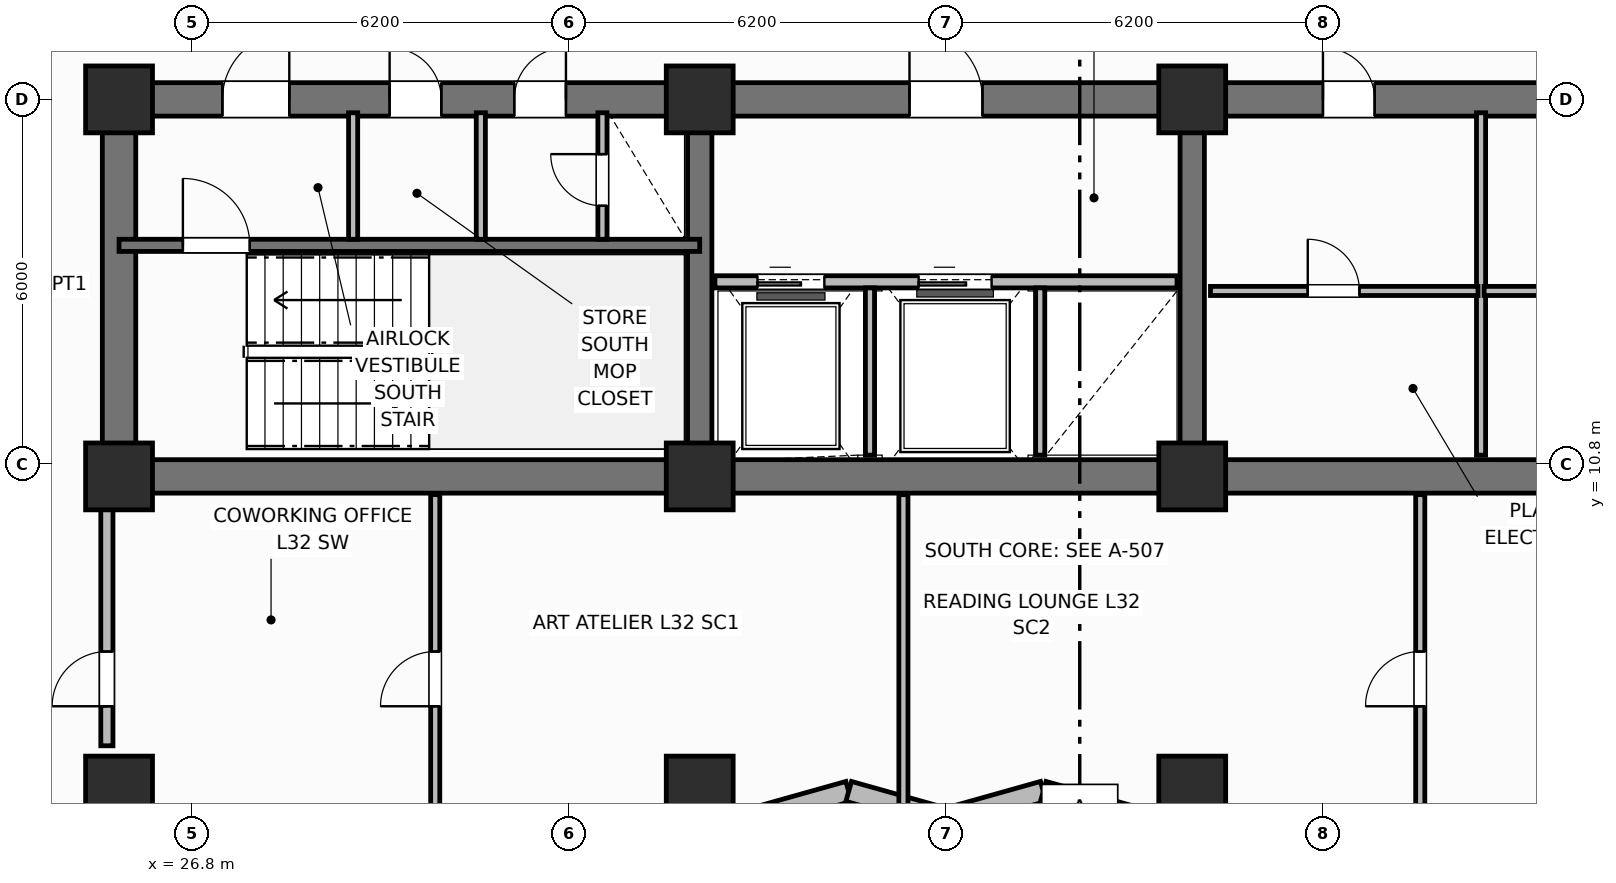
"""IFC4 building model, lengths in metres.
Left out: names, types, materials, properties, quantities, classifications, styles, units other than length and angle.
Written with IfcOpenShell. Run it as: python <this file> out.ifc"""

import sys

from ifc_helpers import new_model, si_unit, direction, frame, frame_2d, origin, origin_2d, place, context, subcontext, project, spatial, rectangle, extrude, element, fill, save


model = new_model("IFC4")
c1 = context("Model", 3, precision=1e-05, world=origin(), true_north=direction((0.0, 1.0)))
c2 = subcontext(c1, "Body", "Model", "MODEL_VIEW")
j1 = project(units=[si_unit("LENGTHUNIT", "METRE"), si_unit("PLANEANGLEUNIT", "RADIAN")], contexts=[c1])
p1 = place(None, origin())
s1 = spatial("IfcSite", under=j1, at=p1, CompositionType="ELEMENT")
p2 = place(p1, origin())
s2 = spatial("IfcBuilding", under=s1, at=p2, CompositionType="ELEMENT")
p3 = place(p2, frame((0.0, 0.0, 129.0)))
s3 = spatial("IfcBuildingStorey", under=s2, at=p3, CompositionType="ELEMENT", Elevation=129.0)
p4 = place(p3, frame((52.8, 10.6, 0.0), z_axis=(0.0, 0.0, 1.0), x_axis=(-1.0, 0.0, 0.0)))
e1 = element("IfcWall", 1, at=p4, inside=s3, PredefinedType="SHEAR", context=c2, shape_type="SweptSolid", body=[
    extrude(rectangle(XDim=27.2, YDim=0.55, at=frame_2d((13.6, 0.0))), origin(), (0.0, 0.0, 1.0), 3.7),
])
p5 = place(p3, frame((25.6, 10.875, 0.0), z_axis=(0.0, 0.0, 1.0), x_axis=(0.0, 1.0, 0.0)))
e2 = element("IfcWall", 2, at=p5, inside=s3, PredefinedType="SHEAR", context=c2, shape_type="SweptSolid", body=[
    extrude(rectangle(XDim=5.65, YDim=0.55, at=frame_2d((2.825, 0.0))), origin(), (0.0, 0.0, 1.0), 3.7),
])
p6 = place(p3, frame((25.6, 16.8, 0.0), z_axis=(0.0, 0.0, 1.0), x_axis=(1.0, 0.0, 0.0)))
e3 = element("IfcWall", 3, at=p6, inside=s3, PredefinedType="SHEAR", context=c2, shape_type="SweptSolid", body=[
    extrude(rectangle(XDim=27.2, YDim=0.55, at=frame_2d((13.6, 0.0))), origin(), (0.0, 0.0, 1.0), 3.7),
])
p7 = place(p6, frame((1.7, 0.0, 0.0)))
e4 = element("IfcOpeningElement", 4, at=p7, cuts=e3, PredefinedType="OPENING", context=c2, shape_type="SweptSolid", body=[
    extrude(rectangle(XDim=1.1, YDim=2.15, at=frame_2d((0.55, 1.075))), frame((0.0, 0.285, 0.0), z_axis=(0.0, -1.0, 0.0), x_axis=(1.0, 0.0, 0.0)), (0.0, 0.0, 1.0), 0.57),
])
p8 = place(p6, frame((4.45, 0.0, 0.0)))
e5 = element("IfcOpeningElement", 5, at=p8, cuts=e3, PredefinedType="OPENING", context=c2, shape_type="SweptSolid", body=[
    extrude(rectangle(XDim=0.85, YDim=2.1, at=frame_2d((0.425, 1.05))), frame((0.0, 0.285, 0.0), z_axis=(0.0, -1.0, 0.0), x_axis=(1.0, 0.0, 0.0)), (0.0, 0.0, 1.0), 0.57),
])
p9 = place(p6, frame((6.5, 0.0, 0.0)))
e6 = element("IfcOpeningElement", 6, at=p9, cuts=e3, PredefinedType="OPENING", context=c2, shape_type="SweptSolid", body=[
    extrude(rectangle(XDim=0.85, YDim=2.1, at=frame_2d((0.425, 1.05))), frame((0.0, 0.285, 0.0), z_axis=(0.0, -1.0, 0.0), x_axis=(1.0, 0.0, 0.0)), (0.0, 0.0, 1.0), 0.57),
])
p10 = place(p6, frame((13.0, 0.0, 0.0)))
e7 = element("IfcOpeningElement", 7, at=p10, cuts=e3, PredefinedType="OPENING", context=c2, shape_type="SweptSolid", body=[
    extrude(rectangle(XDim=1.2, YDim=2.15, at=frame_2d((0.6, 1.075))), frame((0.0, 0.285, 0.0), z_axis=(0.0, -1.0, 0.0), x_axis=(1.0, 0.0, 0.0)), (0.0, 0.0, 1.0), 0.57),
])
p11 = place(p6, frame((19.8, 0.0, 0.0)))
e8 = element("IfcOpeningElement", 8, at=p11, cuts=e3, PredefinedType="OPENING", context=c2, shape_type="SweptSolid", body=[
    extrude(rectangle(XDim=0.85, YDim=2.1, at=frame_2d((0.425, 1.05))), frame((0.0, 0.285, 0.0), z_axis=(0.0, -1.0, 0.0), x_axis=(1.0, 0.0, 0.0)), (0.0, 0.0, 1.0), 0.57),
])
p12 = place(p6, frame((24.2, 0.0, 0.0)))
e9 = element("IfcOpeningElement", 9, at=p12, cuts=e3, PredefinedType="OPENING", context=c2, shape_type="SweptSolid", body=[
    extrude(rectangle(XDim=0.85, YDim=2.1, at=frame_2d((0.425, 1.05))), frame((0.0, 0.285, 0.0), z_axis=(0.0, -1.0, 0.0), x_axis=(1.0, 0.0, 0.0)), (0.0, 0.0, 1.0), 0.57),
])
for number, where, z_axis, x_axis in (
    (10, (35.15, 10.875, 0.0), (0.0, 0.0, 1.0), (0.0, 1.0, 0.0)),
    (11, (43.25, 10.875, 0.0), (0.0, 0.0, 1.0), (0.0, 1.0, 0.0)),
):
    element("IfcWall", number, at=place(p3, frame(where, z_axis=z_axis, x_axis=x_axis)), inside=s3, PredefinedType="SHEAR", context=c2, shape_type="SweptSolid", body=[
        extrude(rectangle(XDim=5.65, YDim=0.4, at=frame_2d((2.825, 0.0))), origin(), (0.0, 0.0, 1.0), 3.7),
    ])
for number, where, z_axis, x_axis in (
    (12, (25.6, 10.6, 0.0), (0.0, 0.0, 1.0), (1.0, 0.0, 0.0)),
    (13, (25.6, 16.8, 0.0), (0.0, 0.0, 1.0), (1.0, 0.0, 0.0)),
    (14, (35.15, 10.6, 0.0), (0.0, 0.0, 1.0), (1.0, 0.0, 0.0)),
    (15, (35.15, 16.8, 0.0), (0.0, 0.0, 1.0), (1.0, 0.0, 0.0)),
    (16, (43.25, 10.6, 0.0), (0.0, 0.0, 1.0), (1.0, 0.0, 0.0)),
    (17, (43.25, 16.8, 0.0), (0.0, 0.0, 1.0), (1.0, 0.0, 0.0)),
    (18, (25.6, 5.45, 0.0), (0.0, 0.0, 1.0), (1.0, 0.0, 0.0)),
    (19, (35.15, 5.45, 0.0), (0.0, 0.0, 1.0), (1.0, 0.0, 0.0)),
    (20, (43.25, 5.45, 0.0), (0.0, 0.0, 1.0), (1.0, 0.0, 0.0)),
):
    element("IfcColumn", number, at=place(p3, frame(where, z_axis=z_axis, x_axis=x_axis)), inside=s3, PredefinedType="COLUMN", context=c2, shape_type="SweptSolid", body=[
        extrude(rectangle(XDim=1.1, YDim=1.1, at=origin_2d()), origin(), (0.0, 0.0, 1.0), 3.7),
    ])
p13 = place(p3, frame((36.0, 4.97, 0.0), z_axis=(0.0, 0.0, 1.0), x_axis=(0.962662902433, 0.270703040766, 0.0)))
e21 = element("IfcWall", 21, at=p13, inside=s3, PredefinedType="SOLIDWALL", context=c2, shape_type="SweptSolid", body=[
    extrude(rectangle(XDim=1.662, YDim=0.34, at=frame_2d((0.831, 0.0))), origin(), (0.0, 0.0, 1.0), 2.7),
])
p14 = place(p3, frame((37.6, 5.42, 0.0), z_axis=(0.0, 0.0, 1.0), x_axis=(0.962652136636, -0.270741322725, 0.0)))
e22 = element("IfcWall", 22, at=p14, inside=s3, PredefinedType="SOLIDWALL", context=c2, shape_type="SweptSolid", body=[
    extrude(rectangle(XDim=1.662, YDim=0.34, at=frame_2d((0.831, 0.0))), origin(), (0.0, 0.0, 1.0), 2.7),
])
p15 = place(p3, frame((39.2, 4.97, 0.0), z_axis=(0.0, 0.0, 1.0), x_axis=(0.962662902433, 0.270703040766, 0.0)))
e23 = element("IfcWall", 23, at=p15, inside=s3, PredefinedType="SOLIDWALL", context=c2, shape_type="SweptSolid", body=[
    extrude(rectangle(XDim=1.662, YDim=0.34, at=frame_2d((0.831, 0.0))), origin(), (0.0, 0.0, 1.0), 2.7),
])
p16 = place(p3, frame((40.8, 5.42, 0.0), z_axis=(0.0, 0.0, 1.0), x_axis=(0.962652136636, -0.270741322725, 0.0)))
e24 = element("IfcWall", 24, at=p16, inside=s3, PredefinedType="SOLIDWALL", context=c2, shape_type="SweptSolid", body=[
    extrude(rectangle(XDim=1.662, YDim=0.34, at=frame_2d((0.831, 0.0))), origin(), (0.0, 0.0, 1.0), 2.7),
])
p17 = place(p3, frame((25.6, 14.4, 0.0), z_axis=(0.0, 0.0, 1.0), x_axis=(1.0, 0.0, 0.0)))
e25 = element("IfcWall", 25, at=p17, inside=s3, PredefinedType="SHEAR", context=c2, shape_type="SweptSolid", body=[
    extrude(rectangle(XDim=9.55, YDim=0.2, at=frame_2d((4.775, 0.0))), origin(), (0.0, 0.0, 1.0), 3.7),
])
p18 = place(p17, frame((1.05, 0.0, 0.0)))
e26 = element("IfcOpeningElement", 26, at=p18, cuts=e25, PredefinedType="OPENING", context=c2, shape_type="SweptSolid", body=[
    extrude(rectangle(XDim=1.1, YDim=2.15, at=frame_2d((0.55, 1.075))), frame((0.0, 0.11, 0.0), z_axis=(0.0, -1.0, 0.0), x_axis=(1.0, 0.0, 0.0)), (0.0, 0.0, 1.0), 0.22),
])
for number, where, z_axis, x_axis in (
    (27, (29.45, 14.5, 0.0), (0.0, 0.0, 1.0), (0.0, 1.0, 0.0)),
    (28, (31.55, 14.5, 0.0), (0.0, 0.0, 1.0), (0.0, 1.0, 0.0)),
):
    element("IfcWall", number, at=place(p3, frame(where, z_axis=z_axis, x_axis=x_axis)), inside=s3, PredefinedType="PARTITIONING", context=c2, shape_type="SweptSolid", body=[
        extrude(rectangle(XDim=2.08, YDim=0.15, at=frame_2d((1.04, 0.0))), origin(), (0.0, 0.0, 1.0), 2.53),
    ])
p19 = place(p3, frame((33.55, 14.5, 0.0), z_axis=(0.0, 0.0, 1.0), x_axis=(0.0, 1.0, 0.0)))
e29 = element("IfcWall", 29, at=p19, inside=s3, PredefinedType="PARTITIONING", context=c2, shape_type="SweptSolid", body=[
    extrude(rectangle(XDim=2.08, YDim=0.15, at=frame_2d((1.04, 0.0))), origin(), (0.0, 0.0, 1.0), 2.53),
])
p20 = place(p19, frame((0.55, 0.0, 0.0)))
e30 = element("IfcOpeningElement", 30, at=p20, cuts=e29, PredefinedType="OPENING", context=c2, shape_type="SweptSolid", body=[
    extrude(rectangle(XDim=0.85, YDim=2.05, at=frame_2d((0.425, 1.025))), frame((0.0, 0.085, 0.0), z_axis=(0.0, -1.0, 0.0), x_axis=(1.0, 0.0, 0.0)), (0.0, 0.0, 1.0), 0.17),
])
p21 = place(p3, frame((35.4, 13.8, 0.0), z_axis=(0.0, 0.0, 1.0), x_axis=(1.0, 0.0, 0.0)))
e31 = element("IfcWall", 31, at=p21, inside=s3, PredefinedType="PARTITIONING", context=c2, shape_type="SweptSolid", body=[
    extrude(rectangle(XDim=7.6, YDim=0.2, at=frame_2d((3.8, 0.0))), origin(), (0.0, 0.0, 1.0), 2.3),
])
p22 = place(p21, frame((0.7, 0.0, 0.0)))
e32 = element("IfcOpeningElement", 32, at=p22, cuts=e31, PredefinedType="OPENING", context=c2, shape_type="SweptSolid", body=[
    extrude(rectangle(XDim=1.1, YDim=2.15, at=frame_2d((0.55, 1.075))), frame((0.0, 0.11, 0.0), z_axis=(0.0, -1.0, 0.0), x_axis=(1.0, 0.0, 0.0)), (0.0, 0.0, 1.0), 0.22),
])
p23 = place(p21, frame((3.35, 0.0, 0.0)))
e33 = element("IfcOpeningElement", 33, at=p23, cuts=e31, PredefinedType="OPENING", context=c2, shape_type="SweptSolid", body=[
    extrude(rectangle(XDim=1.2, YDim=2.15, at=frame_2d((0.6, 1.075))), frame((0.0, 0.11, 0.0), z_axis=(0.0, -1.0, 0.0), x_axis=(1.0, 0.0, 0.0)), (0.0, 0.0, 1.0), 0.22),
])
for number, where, z_axis, x_axis in (
    (34, (37.95, 10.95, 0.0), (0.0, 0.0, 1.0), (0.0, 1.0, 0.0)),
    (35, (40.75, 10.95, 0.0), (0.0, 0.0, 1.0), (0.0, 1.0, 0.0)),
):
    element("IfcWall", number, at=place(p3, frame(where, z_axis=z_axis, x_axis=x_axis)), inside=s3, PredefinedType="PARTITIONING", context=c2, shape_type="SweptSolid", body=[
        extrude(rectangle(XDim=2.75, YDim=0.15, at=frame_2d((1.375, 0.0))), origin(), (0.0, 0.0, 1.0), 2.53),
    ])
p24 = place(p3, frame((48.0, 10.95, 0.0), z_axis=(0.0, 0.0, 1.0), x_axis=(0.0, 1.0, 0.0)))
e36 = element("IfcWall", 36, at=p24, inside=s3, PredefinedType="PARTITIONING", context=c2, shape_type="SweptSolid", body=[
    extrude(rectangle(XDim=5.63, YDim=0.15, at=frame_2d((2.815, 0.0))), origin(), (0.0, 0.0, 1.0), 2.53),
])
p25 = place(p3, frame((43.55, 13.65, 0.0), z_axis=(0.0, 0.0, 1.0), x_axis=(1.0, 0.0, 0.0)))
e37 = element("IfcWall", 37, at=p25, inside=s3, PredefinedType="PARTITIONING", context=c2, shape_type="SweptSolid", body=[
    extrude(rectangle(XDim=4.4, YDim=0.15, at=frame_2d((2.2, 0.0))), origin(), (0.0, 0.0, 1.0), 2.53),
])
p26 = place(p25, frame((1.6, 0.0, 0.0)))
e38 = element("IfcOpeningElement", 38, at=p26, cuts=e37, PredefinedType="OPENING", context=c2, shape_type="SweptSolid", body=[
    extrude(rectangle(XDim=0.85, YDim=2.1, at=frame_2d((0.425, 1.05))), frame((0.0, 0.085, 0.0), z_axis=(0.0, -1.0, 0.0), x_axis=(1.0, 0.0, 0.0)), (0.0, 0.0, 1.0), 0.17),
])
p27 = place(p3, frame((48.05, 13.65, 0.0), z_axis=(0.0, 0.0, 1.0), x_axis=(1.0, 0.0, 0.0)))
e39 = element("IfcWall", 39, at=p27, inside=s3, PredefinedType="PARTITIONING", context=c2, shape_type="SweptSolid", body=[
    extrude(rectangle(XDim=4.4, YDim=0.15, at=frame_2d((2.2, 0.0))), origin(), (0.0, 0.0, 1.0), 2.53),
])
p28 = place(p27, frame((1.6, 0.0, 0.0)))
e40 = element("IfcOpeningElement", 40, at=p28, cuts=e39, PredefinedType="OPENING", context=c2, shape_type="SweptSolid", body=[
    extrude(rectangle(XDim=0.85, YDim=2.1, at=frame_2d((0.425, 1.05))), frame((0.0, 0.085, 0.0), z_axis=(0.0, -1.0, 0.0), x_axis=(1.0, 0.0, 0.0)), (0.0, 0.0, 1.0), 0.17),
])
p29 = place(p3, frame((30.8, 4.97, 0.0), z_axis=(0.0, 0.0, 1.0), x_axis=(0.0, 1.0, 0.0)))
e41 = element("IfcWall", 41, at=p29, inside=s3, PredefinedType="PARTITIONING", context=c2, shape_type="SweptSolid", body=[
    extrude(rectangle(XDim=5.33, YDim=0.15, at=frame_2d((2.665, 0.0))), origin(), (0.0, 0.0, 1.0), 2.53),
])
p30 = place(p29, frame((1.85, 0.0, 0.0)))
e42 = element("IfcOpeningElement", 42, at=p30, cuts=e41, PredefinedType="OPENING", context=c2, shape_type="SweptSolid", body=[
    extrude(rectangle(XDim=0.9, YDim=2.1, at=frame_2d((0.45, 1.05))), frame((0.0, 0.085, 0.0), z_axis=(0.0, -1.0, 0.0), x_axis=(1.0, 0.0, 0.0)), (0.0, 0.0, 1.0), 0.17),
])
p31 = place(p3, frame((38.5, 4.97, 0.0), z_axis=(0.0, 0.0, 1.0), x_axis=(0.0, 1.0, 0.0)))
e43 = element("IfcWall", 43, at=p31, inside=s3, PredefinedType="PARTITIONING", context=c2, shape_type="SweptSolid", body=[
    extrude(rectangle(XDim=5.33, YDim=0.15, at=frame_2d((2.665, 0.0))), origin(), (0.0, 0.0, 1.0), 2.53),
])
p32 = place(p3, frame((47.0, 4.97, 0.0), z_axis=(0.0, 0.0, 1.0), x_axis=(0.0, 1.0, 0.0)))
e44 = element("IfcWall", 44, at=p32, inside=s3, PredefinedType="PARTITIONING", context=c2, shape_type="SweptSolid", body=[
    extrude(rectangle(XDim=5.33, YDim=0.15, at=frame_2d((2.665, 0.0))), origin(), (0.0, 0.0, 1.0), 2.53),
])
p33 = place(p32, frame((1.85, 0.0, 0.0)))
e45 = element("IfcOpeningElement", 45, at=p33, cuts=e44, PredefinedType="OPENING", context=c2, shape_type="SweptSolid", body=[
    extrude(rectangle(XDim=0.9, YDim=2.1, at=frame_2d((0.45, 1.05))), frame((0.0, 0.085, 0.0), z_axis=(0.0, -1.0, 0.0), x_axis=(1.0, 0.0, 0.0)), (0.0, 0.0, 1.0), 0.17),
])
p34 = place(p3, frame((25.4, 6.17, 0.0), z_axis=(0.0, 0.0, 1.0), x_axis=(0.0, 1.0, 0.0)))
e46 = element("IfcWall", 46, at=p34, inside=s3, PredefinedType="PARTITIONING", context=c2, shape_type="SweptSolid", body=[
    extrude(rectangle(XDim=4.13, YDim=0.2, at=frame_2d((2.065, 0.0))), origin(), (0.0, 0.0, 1.0), 2.53),
])
p35 = place(p34, frame((0.65, 0.0, 0.0)))
e47 = element("IfcOpeningElement", 47, at=p35, cuts=e46, PredefinedType="OPENING", context=c2, shape_type="SweptSolid", body=[
    extrude(rectangle(XDim=0.9, YDim=2.1, at=frame_2d((0.45, 1.05))), frame((0.0, 0.11, 0.0), z_axis=(0.0, -1.0, 0.0), x_axis=(1.0, 0.0, 0.0)), (0.0, 0.0, 1.0), 0.22),
])
p36 = place(p18, origin())
e48 = element("IfcDoor", 48, at=p36, inside=s3, OperationType="SINGLE_SWING_LEFT", PredefinedType="DOOR", context=c2, shape_type="SweptSolid", body=[
    extrude(rectangle(XDim=1.1, YDim=2.15, at=frame_2d((0.55, 1.075))), frame((0.0, 0.025, 0.0), z_axis=(0.0, -1.0, 0.0), x_axis=(1.0, 0.0, 0.0)), (0.0, 0.0, 1.0), 0.05),
])
fill(e26, e48)
p37 = place(p20, origin())
e49 = element("IfcDoor", 49, at=p37, inside=s3, OperationType="SINGLE_SWING_RIGHT", PredefinedType="TRAPDOOR", context=c2, shape_type="SweptSolid", body=[
    extrude(rectangle(XDim=0.85, YDim=2.05, at=frame_2d((0.425, 1.025))), frame((0.0, 0.025, 0.0), z_axis=(0.0, -1.0, 0.0), x_axis=(1.0, 0.0, 0.0)), (0.0, 0.0, 1.0), 0.05),
])
fill(e30, e49)
p38 = place(p22, origin())
e50 = element("IfcDoor", 50, at=p38, inside=s3, OperationType="SLIDING_TO_LEFT", PredefinedType="DOOR", context=c2, shape_type="SweptSolid", body=[
    extrude(rectangle(XDim=1.1, YDim=2.15, at=frame_2d((0.55, 1.075))), frame((0.0, 0.025, 0.0), z_axis=(0.0, -1.0, 0.0), x_axis=(1.0, 0.0, 0.0)), (0.0, 0.0, 1.0), 0.05),
])
fill(e32, e50)
p39 = place(p23, origin())
e51 = element("IfcDoor", 51, at=p39, inside=s3, OperationType="SLIDING_TO_LEFT", PredefinedType="DOOR", context=c2, shape_type="SweptSolid", body=[
    extrude(rectangle(XDim=1.2, YDim=2.15, at=frame_2d((0.6, 1.075))), frame((0.0, 0.025, 0.0), z_axis=(0.0, -1.0, 0.0), x_axis=(1.0, 0.0, 0.0)), (0.0, 0.0, 1.0), 0.05),
])
fill(e33, e51)
p40 = place(p26, origin())
e52 = element("IfcDoor", 52, at=p40, inside=s3, OperationType="SINGLE_SWING_LEFT", PredefinedType="DOOR", context=c2, shape_type="SweptSolid", body=[
    extrude(rectangle(XDim=0.85, YDim=2.1, at=frame_2d((0.425, 1.05))), frame((0.0, 0.025, 0.0), z_axis=(0.0, -1.0, 0.0), x_axis=(1.0, 0.0, 0.0)), (0.0, 0.0, 1.0), 0.05),
])
fill(e38, e52)
p41 = place(p30, origin())
e53 = element("IfcDoor", 53, at=p41, inside=s3, OperationType="SINGLE_SWING_LEFT", PredefinedType="DOOR", context=c2, shape_type="SweptSolid", body=[
    extrude(rectangle(XDim=0.9, YDim=2.1, at=frame_2d((0.45, 1.05))), frame((0.0, 0.025, 0.0), z_axis=(0.0, -1.0, 0.0), x_axis=(1.0, 0.0, 0.0)), (0.0, 0.0, 1.0), 0.05),
])
fill(e42, e53)
p42 = place(p33, origin())
e54 = element("IfcDoor", 54, at=p42, inside=s3, OperationType="SINGLE_SWING_LEFT", PredefinedType="DOOR", context=c2, shape_type="SweptSolid", body=[
    extrude(rectangle(XDim=0.9, YDim=2.1, at=frame_2d((0.45, 1.05))), frame((0.0, 0.025, 0.0), z_axis=(0.0, -1.0, 0.0), x_axis=(1.0, 0.0, 0.0)), (0.0, 0.0, 1.0), 0.05),
])
fill(e45, e54)
p43 = place(p35, origin())
e55 = element("IfcDoor", 55, at=p43, inside=s3, OperationType="SINGLE_SWING_LEFT", PredefinedType="DOOR", context=c2, shape_type="SweptSolid", body=[
    extrude(rectangle(XDim=0.9, YDim=2.1, at=frame_2d((0.45, 1.05))), frame((0.0, 0.025, 0.0), z_axis=(0.0, -1.0, 0.0), x_axis=(1.0, 0.0, 0.0)), (0.0, 0.0, 1.0), 0.05),
])
fill(e47, e55)
p44 = place(p7, origin())
e56 = element("IfcDoor", 56, at=p44, inside=s3, OperationType="SINGLE_SWING_RIGHT", PredefinedType="DOOR", context=c2, shape_type="SweptSolid", body=[
    extrude(rectangle(XDim=1.1, YDim=2.15, at=frame_2d((0.55, 1.075))), frame((0.0, 0.025, 0.0), z_axis=(0.0, -1.0, 0.0), x_axis=(1.0, 0.0, 0.0)), (0.0, 0.0, 1.0), 0.05),
])
fill(e4, e56)
p45 = place(p8, origin())
e57 = element("IfcDoor", 57, at=p45, inside=s3, OperationType="SINGLE_SWING_LEFT", PredefinedType="DOOR", context=c2, shape_type="SweptSolid", body=[
    extrude(rectangle(XDim=0.85, YDim=2.1, at=frame_2d((0.425, 1.05))), frame((0.0, 0.025, 0.0), z_axis=(0.0, -1.0, 0.0), x_axis=(1.0, 0.0, 0.0)), (0.0, 0.0, 1.0), 0.05),
])
fill(e5, e57)
p46 = place(p9, origin())
e58 = element("IfcDoor", 58, at=p46, inside=s3, OperationType="SINGLE_SWING_RIGHT", PredefinedType="DOOR", context=c2, shape_type="SweptSolid", body=[
    extrude(rectangle(XDim=0.85, YDim=2.1, at=frame_2d((0.425, 1.05))), frame((0.0, 0.025, 0.0), z_axis=(0.0, -1.0, 0.0), x_axis=(1.0, 0.0, 0.0)), (0.0, 0.0, 1.0), 0.05),
])
fill(e6, e58)
p47 = place(p10, origin())
e59 = element("IfcDoor", 59, at=p47, inside=s3, OperationType="SINGLE_SWING_LEFT", PredefinedType="DOOR", context=c2, shape_type="SweptSolid", body=[
    extrude(rectangle(XDim=1.2, YDim=2.15, at=frame_2d((0.6, 1.075))), frame((0.0, 0.025, 0.0), z_axis=(0.0, -1.0, 0.0), x_axis=(1.0, 0.0, 0.0)), (0.0, 0.0, 1.0), 0.05),
])
fill(e7, e59)
p48 = place(p11, origin())
e60 = element("IfcDoor", 60, at=p48, inside=s3, OperationType="SINGLE_SWING_LEFT", PredefinedType="DOOR", context=c2, shape_type="SweptSolid", body=[
    extrude(rectangle(XDim=0.85, YDim=2.1, at=frame_2d((0.425, 1.05))), frame((0.0, 0.025, 0.0), z_axis=(0.0, -1.0, 0.0), x_axis=(1.0, 0.0, 0.0)), (0.0, 0.0, 1.0), 0.05),
])
fill(e8, e60)
save(model, sys.argv[1])
